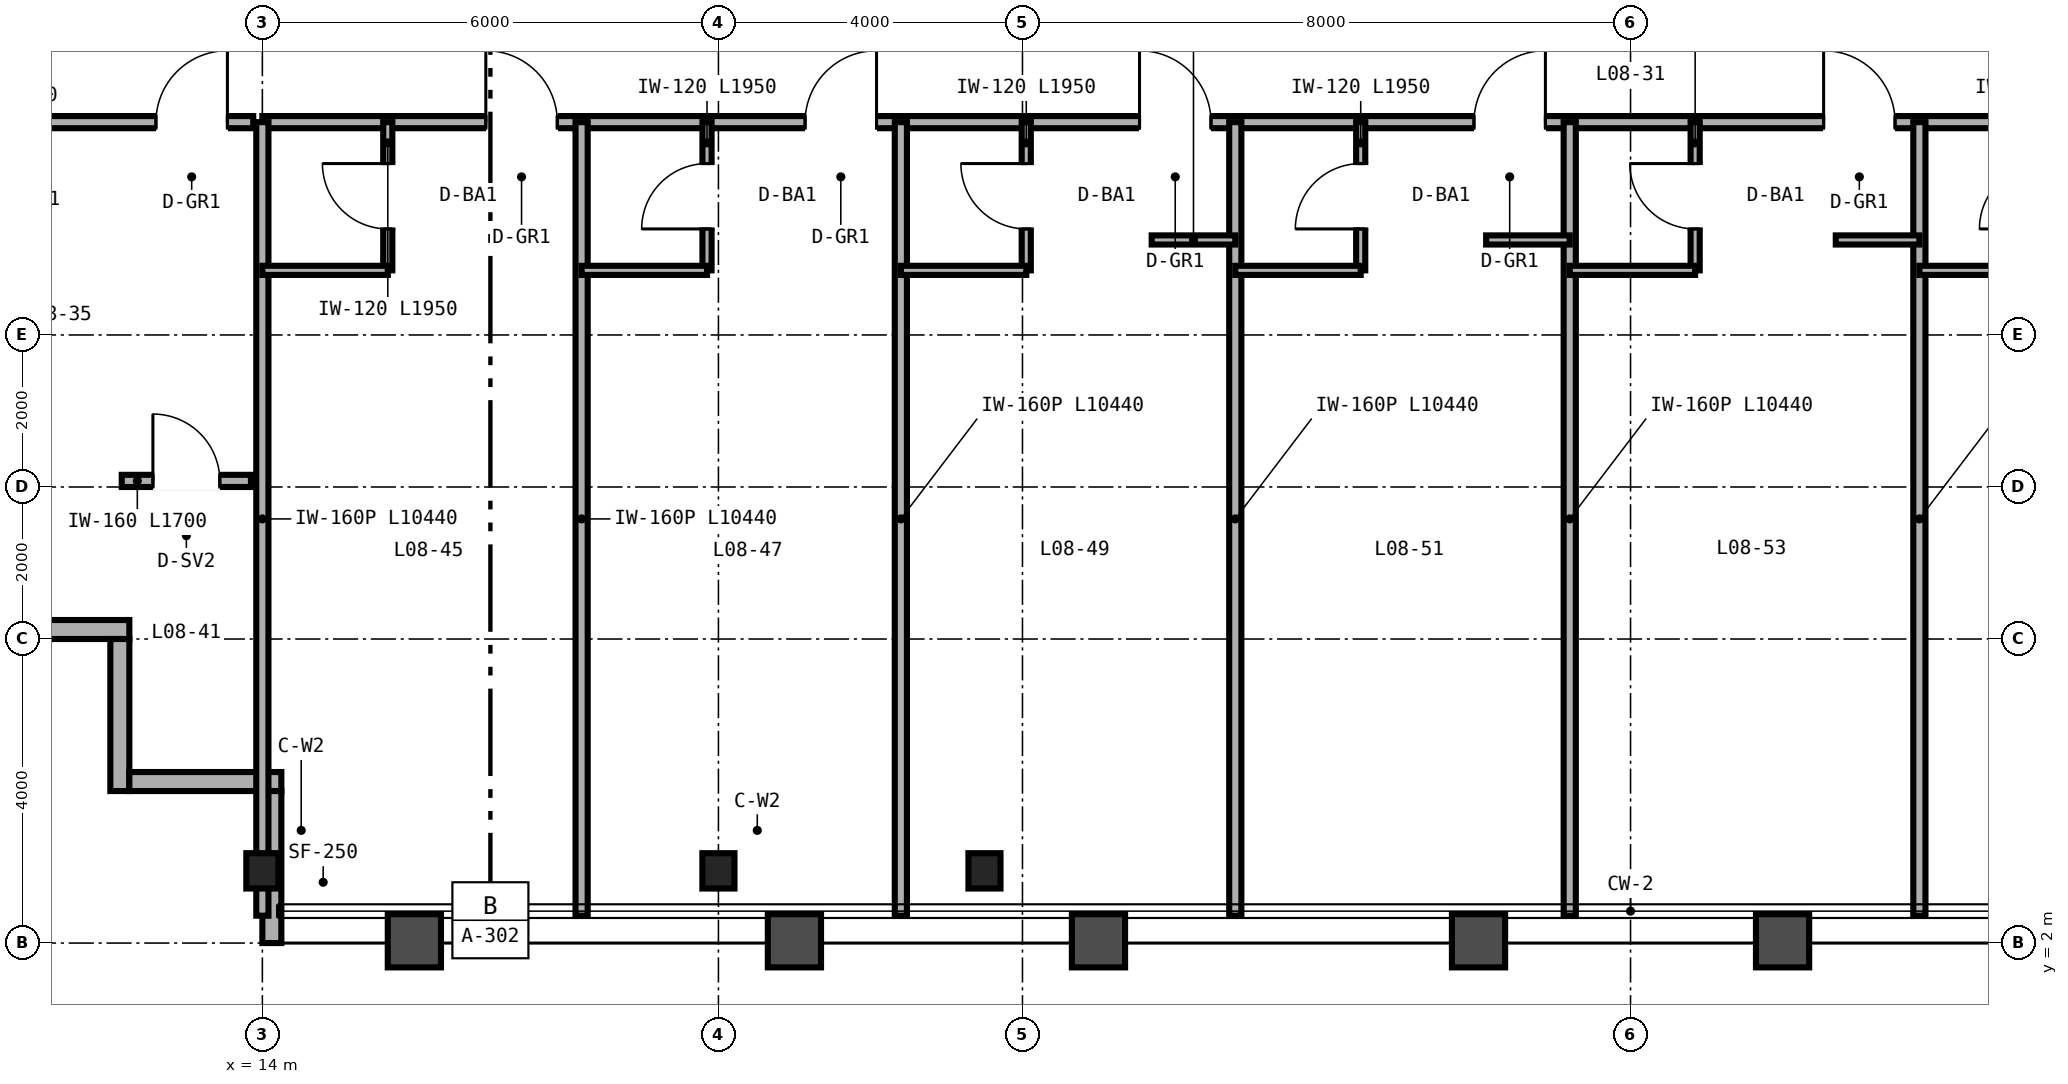
"""IFC4 building model, lengths in metres.
Left out: names, types, materials, properties, quantities, classifications, styles, units other than length and angle.
Written with IfcOpenShell. Run it as: python <this file> out.ifc"""

import sys

from ifc_helpers import new_model, si_unit, direction, frame, frame_2d, origin, origin_2d, place, context, subcontext, project, spatial, rectangle, i_section, extrude, source, transform, mapped, element, fill, save


model = new_model("IFC4")
c1 = context("Model", 3, precision=1e-05, world=origin(), true_north=direction((0.0, 1.0)))
c2 = subcontext(c1, "Body", "Model", "MODEL_VIEW")
j1 = project(units=[si_unit("LENGTHUNIT", "METRE"), si_unit("PLANEANGLEUNIT", "RADIAN")], contexts=[c1])
p1 = place(None, origin())
s1 = spatial("IfcSite", under=j1, at=p1, CompositionType="ELEMENT")
p2 = place(p1, origin())
s2 = spatial("IfcBuilding", under=s1, at=p2, CompositionType="ELEMENT")
p3 = place(p2, frame((0.0, 0.0, 38.4)))
s3 = spatial("IfcBuildingStorey", under=s2, at=p3, CompositionType="ELEMENT", Elevation=38.4)
m1 = source(origin(), c2, "Body", "SweptSolid", [
    extrude(i_section(OverallWidth=0.422, OverallDepth=0.465, WebThickness=0.045, FlangeThickness=0.073, FilletRadius=0.025, at=origin_2d()), origin(), (0.0, 0.0, 1.0), 3.35),
])
for number, where, z_axis, x_axis in (
    (1, (14.0, 2.95, 0.0), (0.0, 0.0, 1.0), (1.0, 0.0, 0.0)),
    (2, (20.0, 2.95, 0.0), (0.0, 0.0, 1.0), (1.0, 0.0, 0.0)),
    (3, (23.5, 2.95, 0.0), (0.0, 0.0, 1.0), (1.0, 0.0, 0.0)),
):
    element("IfcColumn", number, at=place(p3, frame(where, z_axis=z_axis, x_axis=x_axis)), inside=s3, PredefinedType="COLUMN", context=c2, shape_type="MappedRepresentation", body=[
        mapped(m1, transform((0.0, 0.0, 0.0), scale=1.0)),
    ])
for number, where, z_axis, x_axis in (
    (4, (10.25, 6.125, 0.0), (0.0, 0.0, 1.0), (1.0, 0.0, 0.0)),
    (5, (12.125, 6.0, 0.0), (0.0, 0.0, 1.0), (0.0, -1.0, 0.0)),
    (6, (12.25, 4.125, 0.0), (0.0, 0.0, 1.0), (1.0, 0.0, 0.0)),
):
    element("IfcWall", number, at=place(p3, frame(where, z_axis=z_axis, x_axis=x_axis)), inside=s3, PredefinedType="SOLIDWALL", context=c2, shape_type="SweptSolid", body=[
        extrude(rectangle(XDim=2.0, YDim=0.25, at=frame_2d((1.0, 0.0))), origin(), (0.0, 0.0, 1.0), 3.35),
    ])
p4 = place(p3, frame((14.125, 4.0, 0.0), z_axis=(0.0, 0.0, 1.0), x_axis=(0.0, -1.0, 0.0)))
e7 = element("IfcWall", 7, at=p4, inside=s3, PredefinedType="SOLIDWALL", context=c2, shape_type="SweptSolid", body=[
    extrude(rectangle(XDim=2.0, YDim=0.25, at=frame_2d((1.0, 0.0))), origin(), (0.0, 0.0, 1.0), 2.657),
])
p5 = place(p3, frame((8.2, 12.8, 0.0), z_axis=(0.0, 0.0, 1.0), x_axis=(1.0, 0.0, 0.0)))
e8 = element("IfcWall", 8, at=p5, inside=s3, PredefinedType="PARTITIONING", context=c2, shape_type="SweptSolid", body=[
    extrude(rectangle(XDim=5.68, YDim=0.16, at=frame_2d((2.84, 0.0))), origin(), (0.0, 0.0, 1.0), 3.35),
])
p6 = place(p5, frame((4.4, 0.0, 0.0)))
e9 = element("IfcOpeningElement", 9, at=p6, cuts=e8, PredefinedType="OPENING", context=c2, shape_type="SweptSolid", body=[
    extrude(rectangle(XDim=0.94, YDim=2.15, at=frame_2d((0.47, 1.075))), frame((0.0, 0.09, 0.0), z_axis=(0.0, -1.0, 0.0), x_axis=(1.0, 0.0, 0.0)), (0.0, 0.0, 1.0), 0.18),
])
p7 = place(p3, frame((12.15, 8.08, 0.0), z_axis=(0.0, 0.0, 1.0), x_axis=(1.0, 0.0, 0.0)))
e10 = element("IfcWall", 10, at=p7, inside=s3, PredefinedType="PARTITIONING", context=c2, shape_type="SweptSolid", body=[
    extrude(rectangle(XDim=1.7, YDim=0.16, at=frame_2d((0.85, 0.0))), origin(), (0.0, 0.0, 1.0), 3.35),
])
p8 = place(p7, frame((0.41, 0.0, 0.0)))
e11 = element("IfcOpeningElement", 11, at=p8, cuts=e10, PredefinedType="OPENING", context=c2, shape_type="SweptSolid", body=[
    extrude(rectangle(XDim=0.88, YDim=2.15, at=frame_2d((0.44, 1.075))), frame((0.0, 0.09, 0.0), z_axis=(0.0, -1.0, 0.0), x_axis=(1.0, 0.0, 0.0)), (0.0, 0.0, 1.0), 0.18),
])
p9 = place(p3, frame((14.0, 12.8, 0.0), z_axis=(0.0, 0.0, 1.0), x_axis=(1.0, 0.0, 0.0)))
e12 = element("IfcWall", 12, at=p9, inside=s3, PredefinedType="PARTITIONING", context=c2, shape_type="SweptSolid", body=[
    extrude(rectangle(XDim=36.0, YDim=0.16, at=frame_2d((18.0, 0.0))), origin(), (0.0, 0.0, 1.0), 2.571),
])
p10 = place(p9, frame((2.94, 0.0, 0.0)))
e13 = element("IfcOpeningElement", 13, at=p10, cuts=e12, PredefinedType="OPENING", context=c2, shape_type="SweptSolid", body=[
    extrude(rectangle(XDim=0.94, YDim=2.15, at=frame_2d((0.47, 1.075))), frame((0.0, 0.09, 0.0), z_axis=(0.0, -1.0, 0.0), x_axis=(1.0, 0.0, 0.0)), (0.0, 0.0, 1.0), 0.18),
])
p11 = place(p9, frame((7.14, 0.0, 0.0)))
e14 = element("IfcOpeningElement", 14, at=p11, cuts=e12, PredefinedType="OPENING", context=c2, shape_type="SweptSolid", body=[
    extrude(rectangle(XDim=0.94, YDim=2.15, at=frame_2d((0.47, 1.075))), frame((0.0, 0.09, 0.0), z_axis=(0.0, -1.0, 0.0), x_axis=(1.0, 0.0, 0.0)), (0.0, 0.0, 1.0), 0.18),
])
p12 = place(p9, frame((11.54, 0.0, 0.0)))
e15 = element("IfcOpeningElement", 15, at=p12, cuts=e12, PredefinedType="OPENING", context=c2, shape_type="SweptSolid", body=[
    extrude(rectangle(XDim=0.94, YDim=2.15, at=frame_2d((0.47, 1.075))), frame((0.0, 0.09, 0.0), z_axis=(0.0, -1.0, 0.0), x_axis=(1.0, 0.0, 0.0)), (0.0, 0.0, 1.0), 0.18),
])
p13 = place(p9, frame((15.94, 0.0, 0.0)))
e16 = element("IfcOpeningElement", 16, at=p13, cuts=e12, PredefinedType="OPENING", context=c2, shape_type="SweptSolid", body=[
    extrude(rectangle(XDim=0.94, YDim=2.15, at=frame_2d((0.47, 1.075))), frame((0.0, 0.09, 0.0), z_axis=(0.0, -1.0, 0.0), x_axis=(1.0, 0.0, 0.0)), (0.0, 0.0, 1.0), 0.18),
])
p14 = place(p9, frame((20.54, 0.0, 0.0)))
e17 = element("IfcOpeningElement", 17, at=p14, cuts=e12, PredefinedType="OPENING", context=c2, shape_type="SweptSolid", body=[
    extrude(rectangle(XDim=0.94, YDim=2.15, at=frame_2d((0.47, 1.075))), frame((0.0, 0.09, 0.0), z_axis=(0.0, -1.0, 0.0), x_axis=(1.0, 0.0, 0.0)), (0.0, 0.0, 1.0), 0.18),
])
p15 = place(p9, frame((24.84, 0.0, 0.0)))
e18 = element("IfcOpeningElement", 18, at=p15, cuts=e12, PredefinedType="OPENING", context=c2, shape_type="SweptSolid", body=[
    extrude(rectangle(XDim=0.94, YDim=2.15, at=frame_2d((0.47, 1.075))), frame((0.0, 0.09, 0.0), z_axis=(0.0, -1.0, 0.0), x_axis=(1.0, 0.0, 0.0)), (0.0, 0.0, 1.0), 0.18),
])
p16 = place(p9, frame((29.94, 0.0, 0.0)))
e19 = element("IfcOpeningElement", 19, at=p16, cuts=e12, PredefinedType="OPENING", context=c2, shape_type="SweptSolid", body=[
    extrude(rectangle(XDim=0.94, YDim=2.15, at=frame_2d((0.47, 1.075))), frame((0.0, 0.09, 0.0), z_axis=(0.0, -1.0, 0.0), x_axis=(1.0, 0.0, 0.0)), (0.0, 0.0, 1.0), 0.18),
])
p17 = place(p9, frame((34.74, 0.0, 0.0)))
e20 = element("IfcOpeningElement", 20, at=p17, cuts=e12, PredefinedType="OPENING", context=c2, shape_type="SweptSolid", body=[
    extrude(rectangle(XDim=0.94, YDim=2.15, at=frame_2d((0.47, 1.075))), frame((0.0, 0.09, 0.0), z_axis=(0.0, -1.0, 0.0), x_axis=(1.0, 0.0, 0.0)), (0.0, 0.0, 1.0), 0.18),
])
for number, where, z_axis, x_axis in (
    (21, (14.0, 2.36, 0.0), (0.0, 0.0, 1.0), (0.0, 1.0, 0.0)),
    (22, (18.2, 2.36, 0.0), (0.0, 0.0, 1.0), (0.0, 1.0, 0.0)),
):
    element("IfcWall", number, at=place(p3, frame(where, z_axis=z_axis, x_axis=x_axis)), inside=s3, PredefinedType="PARTITIONING", context=c2, shape_type="SweptSolid", body=[
        extrude(rectangle(XDim=10.44, YDim=0.16, at=frame_2d((5.22, 0.0))), origin(), (0.0, 0.0, 1.0), 2.657),
    ])
p18 = place(p3, frame((15.65, 10.85, 0.0), z_axis=(0.0, 0.0, 1.0), x_axis=(0.0, 1.0, 0.0)))
e23 = element("IfcWall", 23, at=p18, inside=s3, PredefinedType="PARTITIONING", context=c2, shape_type="SweptSolid", body=[
    extrude(rectangle(XDim=1.95, YDim=0.12, at=frame_2d((0.975, 0.0))), origin(), (0.0, 0.0, 1.0), 3.35),
])
p19 = place(p18, frame((0.545, 0.0, 0.0)))
e24 = element("IfcOpeningElement", 24, at=p19, cuts=e23, PredefinedType="OPENING", context=c2, shape_type="SweptSolid", body=[
    extrude(rectangle(XDim=0.86, YDim=2.1, at=frame_2d((0.43, 1.05))), frame((0.0, 0.07, 0.0), z_axis=(0.0, -1.0, 0.0), x_axis=(1.0, 0.0, 0.0)), (0.0, 0.0, 1.0), 0.14),
])
p20 = place(p3, frame((14.0, 10.85, 0.0), z_axis=(0.0, 0.0, 1.0), x_axis=(1.0, 0.0, 0.0)))
e25 = element("IfcWall", 25, at=p20, inside=s3, PredefinedType="PARTITIONING", context=c2, shape_type="SweptSolid", body=[
    extrude(rectangle(XDim=1.65, YDim=0.12, at=frame_2d((0.825, 0.0))), origin(), (0.0, 0.0, 1.0), 3.35),
])
p21 = place(p3, frame((22.4, 2.36, 0.0), z_axis=(0.0, 0.0, 1.0), x_axis=(0.0, 1.0, 0.0)))
e26 = element("IfcWall", 26, at=p21, inside=s3, PredefinedType="PARTITIONING", context=c2, shape_type="SweptSolid", body=[
    extrude(rectangle(XDim=10.44, YDim=0.16, at=frame_2d((5.22, 0.0))), origin(), (0.0, 0.0, 1.0), 2.813),
])
p22 = place(p3, frame((19.85, 10.85, 0.0), z_axis=(0.0, 0.0, 1.0), x_axis=(0.0, 1.0, 0.0)))
e27 = element("IfcWall", 27, at=p22, inside=s3, PredefinedType="PARTITIONING", context=c2, shape_type="SweptSolid", body=[
    extrude(rectangle(XDim=1.95, YDim=0.12, at=frame_2d((0.975, 0.0))), origin(), (0.0, 0.0, 1.0), 3.35),
])
p23 = place(p22, frame((0.545, 0.0, 0.0)))
e28 = element("IfcOpeningElement", 28, at=p23, cuts=e27, PredefinedType="OPENING", context=c2, shape_type="SweptSolid", body=[
    extrude(rectangle(XDim=0.86, YDim=2.1, at=frame_2d((0.43, 1.05))), frame((0.0, 0.07, 0.0), z_axis=(0.0, -1.0, 0.0), x_axis=(1.0, 0.0, 0.0)), (0.0, 0.0, 1.0), 0.14),
])
p24 = place(p3, frame((18.2, 10.85, 0.0), z_axis=(0.0, 0.0, 1.0), x_axis=(1.0, 0.0, 0.0)))
e29 = element("IfcWall", 29, at=p24, inside=s3, PredefinedType="PARTITIONING", context=c2, shape_type="SweptSolid", body=[
    extrude(rectangle(XDim=1.65, YDim=0.12, at=frame_2d((0.825, 0.0))), origin(), (0.0, 0.0, 1.0), 3.35),
])
p25 = place(p3, frame((26.8, 2.36, 0.0), z_axis=(0.0, 0.0, 1.0), x_axis=(0.0, 1.0, 0.0)))
e30 = element("IfcWall", 30, at=p25, inside=s3, PredefinedType="PARTITIONING", context=c2, shape_type="SweptSolid", body=[
    extrude(rectangle(XDim=10.44, YDim=0.16, at=frame_2d((5.22, 0.0))), origin(), (0.0, 0.0, 1.0), 2.423),
])
p26 = place(p3, frame((24.05, 10.85, 0.0), z_axis=(0.0, 0.0, 1.0), x_axis=(0.0, 1.0, 0.0)))
e31 = element("IfcWall", 31, at=p26, inside=s3, PredefinedType="PARTITIONING", context=c2, shape_type="SweptSolid", body=[
    extrude(rectangle(XDim=1.95, YDim=0.12, at=frame_2d((0.975, 0.0))), origin(), (0.0, 0.0, 1.0), 3.35),
])
p27 = place(p26, frame((0.545, 0.0, 0.0)))
e32 = element("IfcOpeningElement", 32, at=p27, cuts=e31, PredefinedType="OPENING", context=c2, shape_type="SweptSolid", body=[
    extrude(rectangle(XDim=0.86, YDim=2.1, at=frame_2d((0.43, 1.05))), frame((0.0, 0.07, 0.0), z_axis=(0.0, -1.0, 0.0), x_axis=(1.0, 0.0, 0.0)), (0.0, 0.0, 1.0), 0.14),
])
p28 = place(p3, frame((22.4, 10.85, 0.0), z_axis=(0.0, 0.0, 1.0), x_axis=(1.0, 0.0, 0.0)))
e33 = element("IfcWall", 33, at=p28, inside=s3, PredefinedType="PARTITIONING", context=c2, shape_type="SweptSolid", body=[
    extrude(rectangle(XDim=1.65, YDim=0.12, at=frame_2d((0.825, 0.0))), origin(), (0.0, 0.0, 1.0), 2.571),
])
p29 = place(p3, frame((25.7, 11.25, 0.0), z_axis=(0.0, 0.0, 1.0), x_axis=(1.0, 0.0, 0.0)))
e34 = element("IfcWall", 34, at=p29, inside=s3, PredefinedType="PARTITIONING", context=c2, shape_type="SweptSolid", body=[
    extrude(rectangle(XDim=1.1, YDim=0.12, at=frame_2d((0.55, 0.0))), origin(), (0.0, 0.0, 1.0), 3.35),
])
p30 = place(p3, frame((31.2, 2.36, 0.0), z_axis=(0.0, 0.0, 1.0), x_axis=(0.0, 1.0, 0.0)))
e35 = element("IfcWall", 35, at=p30, inside=s3, PredefinedType="PARTITIONING", context=c2, shape_type="SweptSolid", body=[
    extrude(rectangle(XDim=10.44, YDim=0.16, at=frame_2d((5.22, 0.0))), origin(), (0.0, 0.0, 1.0), 2.423),
])
p31 = place(p3, frame((28.45, 10.85, 0.0), z_axis=(0.0, 0.0, 1.0), x_axis=(0.0, 1.0, 0.0)))
e36 = element("IfcWall", 36, at=p31, inside=s3, PredefinedType="PARTITIONING", context=c2, shape_type="SweptSolid", body=[
    extrude(rectangle(XDim=1.95, YDim=0.12, at=frame_2d((0.975, 0.0))), origin(), (0.0, 0.0, 1.0), 3.35),
])
p32 = place(p31, frame((0.545, 0.0, 0.0)))
e37 = element("IfcOpeningElement", 37, at=p32, cuts=e36, PredefinedType="OPENING", context=c2, shape_type="SweptSolid", body=[
    extrude(rectangle(XDim=0.86, YDim=2.1, at=frame_2d((0.43, 1.05))), frame((0.0, 0.07, 0.0), z_axis=(0.0, -1.0, 0.0), x_axis=(1.0, 0.0, 0.0)), (0.0, 0.0, 1.0), 0.14),
])
p33 = place(p3, frame((26.8, 10.85, 0.0), z_axis=(0.0, 0.0, 1.0), x_axis=(1.0, 0.0, 0.0)))
e38 = element("IfcWall", 38, at=p33, inside=s3, PredefinedType="PARTITIONING", context=c2, shape_type="SweptSolid", body=[
    extrude(rectangle(XDim=1.65, YDim=0.12, at=frame_2d((0.825, 0.0))), origin(), (0.0, 0.0, 1.0), 3.35),
])
p34 = place(p3, frame((30.1, 11.25, 0.0), z_axis=(0.0, 0.0, 1.0), x_axis=(1.0, 0.0, 0.0)))
e39 = element("IfcWall", 39, at=p34, inside=s3, PredefinedType="PARTITIONING", context=c2, shape_type="SweptSolid", body=[
    extrude(rectangle(XDim=1.1, YDim=0.12, at=frame_2d((0.55, 0.0))), origin(), (0.0, 0.0, 1.0), 3.35),
])
p35 = place(p3, frame((35.8, 2.36, 0.0), z_axis=(0.0, 0.0, 1.0), x_axis=(0.0, 1.0, 0.0)))
e40 = element("IfcWall", 40, at=p35, inside=s3, PredefinedType="PARTITIONING", context=c2, shape_type="SweptSolid", body=[
    extrude(rectangle(XDim=10.44, YDim=0.16, at=frame_2d((5.22, 0.0))), origin(), (0.0, 0.0, 1.0), 2.423),
])
p36 = place(p3, frame((32.85, 10.85, 0.0), z_axis=(0.0, 0.0, 1.0), x_axis=(0.0, 1.0, 0.0)))
e41 = element("IfcWall", 41, at=p36, inside=s3, PredefinedType="PARTITIONING", context=c2, shape_type="SweptSolid", body=[
    extrude(rectangle(XDim=1.95, YDim=0.12, at=frame_2d((0.975, 0.0))), origin(), (0.0, 0.0, 1.0), 3.35),
])
p37 = place(p36, frame((0.545, 0.0, 0.0)))
e42 = element("IfcOpeningElement", 42, at=p37, cuts=e41, PredefinedType="OPENING", context=c2, shape_type="SweptSolid", body=[
    extrude(rectangle(XDim=0.86, YDim=2.1, at=frame_2d((0.43, 1.05))), frame((0.0, 0.07, 0.0), z_axis=(0.0, -1.0, 0.0), x_axis=(1.0, 0.0, 0.0)), (0.0, 0.0, 1.0), 0.14),
])
p38 = place(p3, frame((31.2, 10.85, 0.0), z_axis=(0.0, 0.0, 1.0), x_axis=(1.0, 0.0, 0.0)))
e43 = element("IfcWall", 43, at=p38, inside=s3, PredefinedType="PARTITIONING", context=c2, shape_type="SweptSolid", body=[
    extrude(rectangle(XDim=1.65, YDim=0.12, at=frame_2d((0.825, 0.0))), origin(), (0.0, 0.0, 1.0), 3.35),
])
p39 = place(p3, frame((34.7, 11.25, 0.0), z_axis=(0.0, 0.0, 1.0), x_axis=(1.0, 0.0, 0.0)))
e44 = element("IfcWall", 44, at=p39, inside=s3, PredefinedType="PARTITIONING", context=c2, shape_type="SweptSolid", body=[
    extrude(rectangle(XDim=1.1, YDim=0.12, at=frame_2d((0.55, 0.0))), origin(), (0.0, 0.0, 1.0), 3.35),
])
p40 = place(p3, frame((35.8, 10.85, 0.0), z_axis=(0.0, 0.0, 1.0), x_axis=(1.0, 0.0, 0.0)))
e45 = element("IfcWall", 45, at=p40, inside=s3, PredefinedType="PARTITIONING", context=c2, shape_type="SweptSolid", body=[
    extrude(rectangle(XDim=1.65, YDim=0.12, at=frame_2d((0.825, 0.0))), origin(), (0.0, 0.0, 1.0), 3.35),
])
m2 = source(origin(), c2, "Body", "SweptSolid", [
    extrude(rectangle(XDim=0.94, YDim=2.15, at=frame_2d((0.47, 1.075))), frame((0.0, 0.025, 0.0), z_axis=(0.0, -1.0, 0.0), x_axis=(1.0, 0.0, 0.0)), (0.0, 0.0, 1.0), 0.05),
])
p41 = place(p6, origin())
e46 = element("IfcDoor", 46, at=p41, inside=s3, OperationType="SINGLE_SWING_RIGHT", PredefinedType="DOOR", context=c2, shape_type="MappedRepresentation", body=[
    mapped(m2, transform((0.0, 0.0, 0.0), scale=1.0)),
])
fill(e9, e46)
m3 = source(origin(), c2, "Body", "SweptSolid", [
    extrude(rectangle(XDim=0.88, YDim=2.15, at=frame_2d((0.44, 1.075))), frame((0.0, 0.025, 0.0), z_axis=(0.0, -1.0, 0.0), x_axis=(1.0, 0.0, 0.0)), (0.0, 0.0, 1.0), 0.05),
])
p42 = place(p8, origin())
e47 = element("IfcDoor", 47, at=p42, inside=s3, OperationType="SINGLE_SWING_LEFT", PredefinedType="DOOR", context=c2, shape_type="MappedRepresentation", body=[
    mapped(m3, transform((0.0, 0.0, 0.0), scale=1.0)),
])
fill(e11, e47)
m4 = source(origin(), c2, "Body", "SweptSolid", [
    extrude(rectangle(XDim=0.86, YDim=2.1, at=frame_2d((0.43, 1.05))), frame((0.0, 0.025, 0.0), z_axis=(0.0, -1.0, 0.0), x_axis=(1.0, 0.0, 0.0)), (0.0, 0.0, 1.0), 0.05),
])
p43 = place(p19, origin())
e48 = element("IfcDoor", 48, at=p43, inside=s3, OperationType="SINGLE_SWING_RIGHT", PredefinedType="DOOR", context=c2, shape_type="MappedRepresentation", body=[
    mapped(m4, transform((0.0, 0.0, 0.0), scale=1.0)),
])
fill(e24, e48)
p44 = place(p23, origin())
e49 = element("IfcDoor", 49, at=p44, inside=s3, OperationType="SINGLE_SWING_LEFT", PredefinedType="DOOR", context=c2, shape_type="MappedRepresentation", body=[
    mapped(m4, transform((0.0, 0.0, 0.0), scale=1.0)),
])
fill(e28, e49)
p45 = place(p27, origin())
e50 = element("IfcDoor", 50, at=p45, inside=s3, OperationType="SINGLE_SWING_RIGHT", PredefinedType="DOOR", context=c2, shape_type="MappedRepresentation", body=[
    mapped(m4, transform((0.0, 0.0, 0.0), scale=1.0)),
])
fill(e32, e50)
p46 = place(p32, origin())
e51 = element("IfcDoor", 51, at=p46, inside=s3, OperationType="SINGLE_SWING_LEFT", PredefinedType="DOOR", context=c2, shape_type="MappedRepresentation", body=[
    mapped(m4, transform((0.0, 0.0, 0.0), scale=1.0)),
])
fill(e37, e51)
p47 = place(p37, origin())
e52 = element("IfcDoor", 52, at=p47, inside=s3, OperationType="SINGLE_SWING_RIGHT", PredefinedType="DOOR", context=c2, shape_type="MappedRepresentation", body=[
    mapped(m4, transform((0.0, 0.0, 0.0), scale=1.0)),
])
fill(e42, e52)
p48 = place(p10, origin())
e53 = element("IfcDoor", 53, at=p48, inside=s3, OperationType="SINGLE_SWING_LEFT", PredefinedType="DOOR", context=c2, shape_type="MappedRepresentation", body=[
    mapped(m2, transform((0.0, 0.0, 0.0), scale=1.0)),
])
fill(e13, e53)
p49 = place(p11, origin())
e54 = element("IfcDoor", 54, at=p49, inside=s3, OperationType="SINGLE_SWING_RIGHT", PredefinedType="DOOR", context=c2, shape_type="MappedRepresentation", body=[
    mapped(m2, transform((0.0, 0.0, 0.0), scale=1.0)),
])
fill(e14, e54)
p50 = place(p12, origin())
e55 = element("IfcDoor", 55, at=p50, inside=s3, OperationType="SINGLE_SWING_LEFT", PredefinedType="DOOR", context=c2, shape_type="MappedRepresentation", body=[
    mapped(m2, transform((0.0, 0.0, 0.0), scale=1.0)),
])
fill(e15, e55)
p51 = place(p13, origin())
e56 = element("IfcDoor", 56, at=p51, inside=s3, OperationType="SINGLE_SWING_RIGHT", PredefinedType="DOOR", context=c2, shape_type="MappedRepresentation", body=[
    mapped(m2, transform((0.0, 0.0, 0.0), scale=1.0)),
])
fill(e16, e56)
p52 = place(p14, origin())
e57 = element("IfcDoor", 57, at=p52, inside=s3, OperationType="SINGLE_SWING_LEFT", PredefinedType="DOOR", context=c2, shape_type="MappedRepresentation", body=[
    mapped(m2, transform((0.0, 0.0, 0.0), scale=1.0)),
])
fill(e17, e57)
save(model, sys.argv[1])
